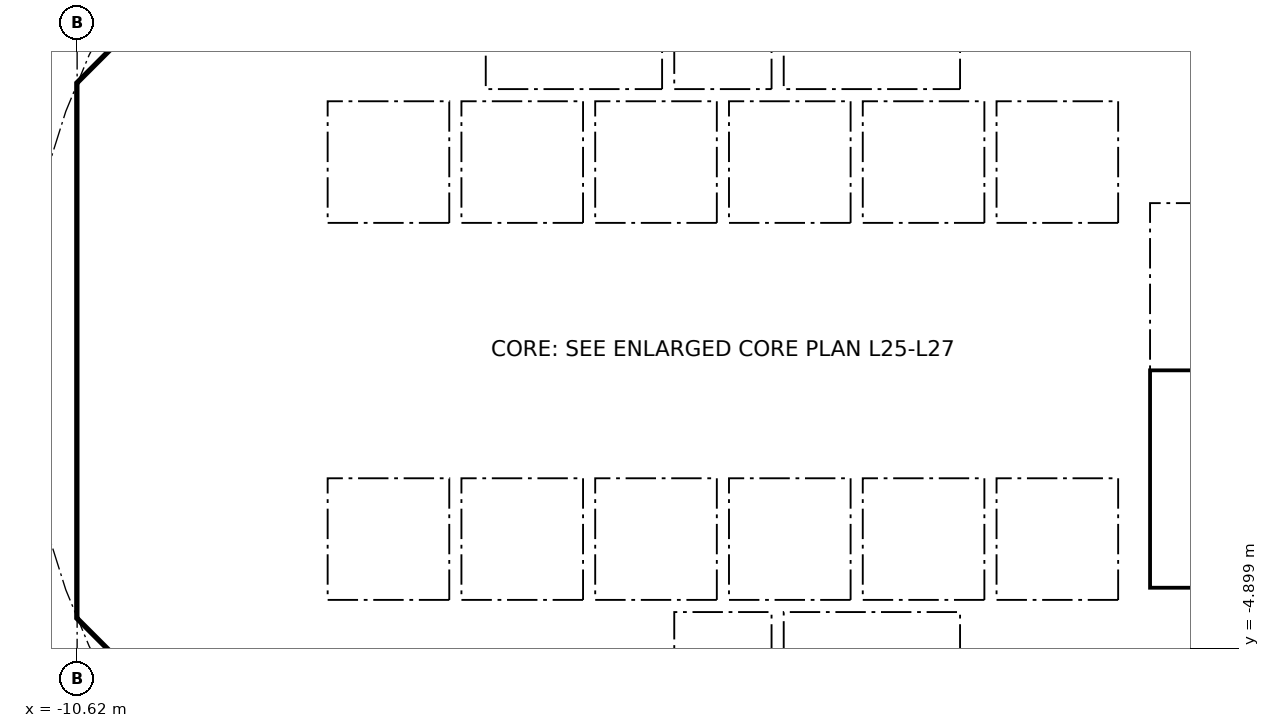
"""IFC4 building model, lengths in metres.
Left out: names, types, materials, properties, quantities, classifications, styles, units other than length and angle.
Written with IfcOpenShell. Run it as: python <this file> out.ifc"""

import sys

from ifc_helpers import new_model, si_unit, direction, frame, frame_2d, origin, place, context, subcontext, project, spatial, polyline, rectangle, outline, extrude, element, fill, save


model = new_model("IFC4")
c1 = context("Model", 3, precision=1e-05, world=origin(), true_north=direction((0.0, 1.0)))
c2 = subcontext(c1, "Body", "Model", "MODEL_VIEW")
j1 = project(units=[si_unit("LENGTHUNIT", "METRE"), si_unit("PLANEANGLEUNIT", "RADIAN")], contexts=[c1])
p1 = place(None, origin())
s1 = spatial("IfcSite", under=j1, at=p1, CompositionType="ELEMENT")
p2 = place(p1, origin())
s2 = spatial("IfcBuilding", under=s1, at=p2, CompositionType="ELEMENT")
p3 = place(p2, frame((0.0, 0.0, 102.9)))
s3 = spatial("IfcBuildingStorey", under=s2, at=p3, CompositionType="ELEMENT", Elevation=102.9)
p4 = place(p3, frame((9.988, 4.613, 0.0), z_axis=(0.0, 0.0, 1.0), x_axis=(-0.707106781187, 0.707106781187, 0.0)))
e1 = element("IfcWall", 1, at=p4, inside=s3, PredefinedType="SHEAR", context=c2, shape_type="SweptSolid", body=[
    extrude(rectangle(XDim=7.602, YDim=0.6, at=frame_2d((3.801, 0.0))), origin(), (0.0, 0.0, 1.0), 3.44),
])
p5 = place(p4, frame((3.201, 0.0, 0.0)))
e2 = element("IfcOpeningElement", 2, at=p5, cuts=e1, PredefinedType="OPENING", context=c2, shape_type="SweptSolid", body=[
    extrude(rectangle(XDim=1.2, YDim=2.1, at=frame_2d((0.6, 1.05))), frame((0.0, 0.31, 0.0), z_axis=(0.0, -1.0, 0.0), x_axis=(1.0, 0.0, 0.0)), (0.0, 0.0, 1.0), 0.62),
])
p6 = place(p3, frame((-4.613, 9.988, 0.0), z_axis=(0.0, 0.0, 1.0), x_axis=(-0.707106781187, -0.707106781187, 0.0)))
e3 = element("IfcWall", 3, at=p6, inside=s3, PredefinedType="SHEAR", context=c2, shape_type="SweptSolid", body=[
    extrude(rectangle(XDim=7.602, YDim=0.6, at=frame_2d((3.801, 0.0))), origin(), (0.0, 0.0, 1.0), 3.44),
])
p7 = place(p6, frame((0.351, 0.0, 0.0)))
e4 = element("IfcOpeningElement", 4, at=p7, cuts=e3, PredefinedType="OPENING", context=c2, shape_type="SweptSolid", body=[
    extrude(rectangle(XDim=1.1, YDim=2.1, at=frame_2d((0.55, 1.05))), frame((0.0, 0.31, 0.0), z_axis=(0.0, -1.0, 0.0), x_axis=(1.0, 0.0, 0.0)), (0.0, 0.0, 1.0), 0.62),
])
p8 = place(p3, frame((-10.325, 3.801, 0.0), z_axis=(0.0, 0.0, 1.0), x_axis=(0.0, -1.0, 0.0)))
e5 = element("IfcWall", 5, at=p8, inside=s3, PredefinedType="SHEAR", context=c2, shape_type="SweptSolid", body=[
    extrude(rectangle(XDim=7.602, YDim=0.6, at=frame_2d((3.801, 0.0))), origin(), (0.0, 0.0, 1.0), 3.44),
])
p9 = place(p8, frame((0.651, 0.0, 0.0)))
e6 = element("IfcOpeningElement", 6, at=p9, cuts=e5, PredefinedType="OPENING", context=c2, shape_type="SweptSolid", body=[
    extrude(rectangle(XDim=1.5, YDim=2.1, at=frame_2d((0.75, 1.05))), frame((0.0, 0.31, 0.0), z_axis=(0.0, -1.0, 0.0), x_axis=(1.0, 0.0, 0.0)), (0.0, 0.0, 1.0), 0.62),
])
p10 = place(p8, frame((5.451, 0.0, 0.0)))
e7 = element("IfcOpeningElement", 7, at=p10, cuts=e5, PredefinedType="OPENING", context=c2, shape_type="SweptSolid", body=[
    extrude(rectangle(XDim=1.5, YDim=2.1, at=frame_2d((0.75, 1.05))), frame((0.0, 0.31, 0.0), z_axis=(0.0, -1.0, 0.0), x_axis=(1.0, 0.0, 0.0)), (0.0, 0.0, 1.0), 0.62),
])
p11 = place(p3, frame((-9.988, -4.613, 0.0), z_axis=(0.0, 0.0, 1.0), x_axis=(0.707106781187, -0.707106781187, 0.0)))
e8 = element("IfcWall", 8, at=p11, inside=s3, PredefinedType="SHEAR", context=c2, shape_type="SweptSolid", body=[
    extrude(rectangle(XDim=7.602, YDim=0.6, at=frame_2d((3.801, 0.0))), origin(), (0.0, 0.0, 1.0), 3.44),
])
p12 = place(p11, frame((6.151, 0.0, 0.0)))
e9 = element("IfcOpeningElement", 9, at=p12, cuts=e8, PredefinedType="OPENING", context=c2, shape_type="SweptSolid", body=[
    extrude(rectangle(XDim=1.1, YDim=2.1, at=frame_2d((0.55, 1.05))), frame((0.0, 0.31, 0.0), z_axis=(0.0, -1.0, 0.0), x_axis=(1.0, 0.0, 0.0)), (0.0, 0.0, 1.0), 0.62),
])
p13 = place(p3, frame((4.613, -9.988, 0.0), z_axis=(0.0, 0.0, 1.0), x_axis=(0.707106781187, 0.707106781187, 0.0)))
e10 = element("IfcWall", 10, at=p13, inside=s3, PredefinedType="SHEAR", context=c2, shape_type="SweptSolid", body=[
    extrude(rectangle(XDim=7.602, YDim=0.6, at=frame_2d((3.801, 0.0))), origin(), (0.0, 0.0, 1.0), 3.44),
])
p14 = place(p13, frame((3.201, 0.0, 0.0)))
e11 = element("IfcOpeningElement", 11, at=p14, cuts=e10, PredefinedType="OPENING", context=c2, shape_type="SweptSolid", body=[
    extrude(rectangle(XDim=1.2, YDim=2.1, at=frame_2d((0.6, 1.05))), frame((0.0, 0.31, 0.0), z_axis=(0.0, -1.0, 0.0), x_axis=(1.0, 0.0, 0.0)), (0.0, 0.0, 1.0), 0.62),
])
p15 = place(p3, frame((-5.8, 4.3, 0.0), z_axis=(0.0, 0.0, 1.0), x_axis=(0.0, 1.0, 0.0)))
e12 = element("IfcWall", 12, at=p15, inside=s3, PredefinedType="PARTITIONING", context=c2, shape_type="SweptSolid", body=[
    extrude(rectangle(XDim=3.927, YDim=0.15, at=frame_2d((1.963, 0.0))), origin(), (0.0, 0.0, 1.0), 3.44),
])
p16 = place(p15, frame((0.413, 0.0, 0.0)))
e13 = element("IfcOpeningElement", 13, at=p16, cuts=e12, PredefinedType="OPENING", context=c2, shape_type="SweptSolid", body=[
    extrude(rectangle(XDim=0.9, YDim=2.1, at=frame_2d((0.45, 1.05))), frame((0.0, 0.085, 0.0), z_axis=(0.0, -1.0, 0.0), x_axis=(1.0, 0.0, 0.0)), (0.0, 0.0, 1.0), 0.17),
])
p17 = place(p15, frame((2.489, 0.0, 0.0)))
e14 = element("IfcOpeningElement", 14, at=p17, cuts=e12, PredefinedType="OPENING", context=c2, shape_type="SweptSolid", body=[
    extrude(rectangle(XDim=0.9, YDim=2.1, at=frame_2d((0.45, 1.05))), frame((0.0, 0.085, 0.0), z_axis=(0.0, -1.0, 0.0), x_axis=(1.0, 0.0, 0.0)), (0.0, 0.0, 1.0), 0.17),
])
p18 = place(p3, frame((4.0, 4.3, 0.0), z_axis=(0.0, 0.0, 1.0), x_axis=(0.0, 1.0, 0.0)))
e15 = element("IfcWall", 15, at=p18, inside=s3, PredefinedType="SOLIDWALL", context=c2, shape_type="SweptSolid", body=[
    extrude(rectangle(XDim=2.2, YDim=0.2, at=frame_2d((1.1, 0.0))), origin(), (0.0, 0.0, 1.0), 3.44),
])
p19 = place(p18, frame((0.55, 0.0, 0.0)))
e16 = element("IfcOpeningElement", 16, at=p19, cuts=e15, PredefinedType="OPENING", context=c2, shape_type="SweptSolid", body=[
    extrude(rectangle(XDim=1.1, YDim=2.1, at=frame_2d((0.55, 1.05))), frame((0.0, 0.11, 0.0), z_axis=(0.0, -1.0, 0.0), x_axis=(1.0, 0.0, 0.0)), (0.0, 0.0, 1.0), 0.22),
])
p20 = place(p3, frame((-4.0, 4.3, 0.0), z_axis=(0.0, 0.0, 1.0), x_axis=(0.0, 1.0, 0.0)))
e17 = element("IfcWall", 17, at=p20, inside=s3, PredefinedType="SOLIDWALL", context=c2, shape_type="SweptSolid", body=[
    extrude(rectangle(XDim=2.2, YDim=0.2, at=frame_2d((1.1, 0.0))), origin(), (0.0, 0.0, 1.0), 3.44),
])
p21 = place(p20, frame((0.55, 0.0, 0.0)))
e18 = element("IfcOpeningElement", 18, at=p21, cuts=e17, PredefinedType="OPENING", context=c2, shape_type="SweptSolid", body=[
    extrude(rectangle(XDim=1.1, YDim=2.1, at=frame_2d((0.55, 1.05))), frame((0.0, 0.11, 0.0), z_axis=(0.0, -1.0, 0.0), x_axis=(1.0, 0.0, 0.0)), (0.0, 0.0, 1.0), 0.22),
])
p22 = place(p3, frame((-6.7, 2.0, 0.0), z_axis=(0.0, 0.0, 1.0), x_axis=(1.0, 0.0, 0.0)))
e19 = element("IfcWall", 19, at=p22, inside=s3, PredefinedType="SOLIDWALL", context=c2, shape_type="SweptSolid", body=[
    extrude(rectangle(XDim=13.4, YDim=0.2, at=frame_2d((6.7, 0.0))), origin(), (0.0, 0.0, 1.0), 3.44),
])
p23 = place(p22, frame((0.65, 0.0, 0.0)))
e20 = element("IfcOpeningElement", 20, at=p23, cuts=e19, PredefinedType="OPENING", context=c2, shape_type="SweptSolid", body=[
    extrude(rectangle(XDim=1.1, YDim=2.1, at=frame_2d((0.55, 1.05))), frame((0.0, 0.11, 0.0), z_axis=(0.0, -1.0, 0.0), x_axis=(1.0, 0.0, 0.0)), (0.0, 0.0, 1.0), 0.22),
])
p24 = place(p22, frame((2.85, 0.0, 0.0)))
e21 = element("IfcOpeningElement", 21, at=p24, cuts=e19, PredefinedType="OPENING", context=c2, shape_type="SweptSolid", body=[
    extrude(rectangle(XDim=1.1, YDim=2.1, at=frame_2d((0.55, 1.05))), frame((0.0, 0.11, 0.0), z_axis=(0.0, -1.0, 0.0), x_axis=(1.0, 0.0, 0.0)), (0.0, 0.0, 1.0), 0.22),
])
p25 = place(p22, frame((5.05, 0.0, 0.0)))
e22 = element("IfcOpeningElement", 22, at=p25, cuts=e19, PredefinedType="OPENING", context=c2, shape_type="SweptSolid", body=[
    extrude(rectangle(XDim=1.1, YDim=2.1, at=frame_2d((0.55, 1.05))), frame((0.0, 0.11, 0.0), z_axis=(0.0, -1.0, 0.0), x_axis=(1.0, 0.0, 0.0)), (0.0, 0.0, 1.0), 0.22),
])
p26 = place(p3, frame((6.7, 4.0, 0.0), z_axis=(0.0, 0.0, 1.0), x_axis=(1.0, 0.0, 0.0)))
e23 = element("IfcWall", 23, at=p26, inside=s3, PredefinedType="SOLIDWALL", context=c2, shape_type="SweptSolid", body=[
    extrude(rectangle(XDim=3.325, YDim=0.2, at=frame_2d((1.662, 0.0))), origin(), (0.0, 0.0, 1.0), 3.44),
])
p27 = place(p26, frame((1.25, 0.0, 0.0)))
e24 = element("IfcOpeningElement", 24, at=p27, cuts=e23, PredefinedType="OPENING", context=c2, shape_type="SweptSolid", body=[
    extrude(rectangle(XDim=1.1, YDim=2.1, at=frame_2d((0.55, 1.05))), frame((0.0, 0.11, 0.0), z_axis=(0.0, -1.0, 0.0), x_axis=(1.0, 0.0, 0.0)), (0.0, 0.0, 1.0), 0.22),
])
p28 = place(p3, frame((-5.8, -8.227, 0.0), z_axis=(0.0, 0.0, 1.0), x_axis=(0.0, 1.0, 0.0)))
e25 = element("IfcWall", 25, at=p28, inside=s3, PredefinedType="PARTITIONING", context=c2, shape_type="SweptSolid", body=[
    extrude(rectangle(XDim=3.927, YDim=0.15, at=frame_2d((1.963, 0.0))), origin(), (0.0, 0.0, 1.0), 3.44),
])
p29 = place(p28, frame((2.615, 0.0, 0.0)))
e26 = element("IfcOpeningElement", 26, at=p29, cuts=e25, PredefinedType="OPENING", context=c2, shape_type="SweptSolid", body=[
    extrude(rectangle(XDim=0.9, YDim=2.1, at=frame_2d((0.45, 1.05))), frame((0.0, 0.085, 0.0), z_axis=(0.0, -1.0, 0.0), x_axis=(1.0, 0.0, 0.0)), (0.0, 0.0, 1.0), 0.17),
])
p30 = place(p28, frame((0.539, 0.0, 0.0)))
e27 = element("IfcOpeningElement", 27, at=p30, cuts=e25, PredefinedType="OPENING", context=c2, shape_type="SweptSolid", body=[
    extrude(rectangle(XDim=0.9, YDim=2.1, at=frame_2d((0.45, 1.05))), frame((0.0, 0.085, 0.0), z_axis=(0.0, -1.0, 0.0), x_axis=(1.0, 0.0, 0.0)), (0.0, 0.0, 1.0), 0.17),
])
p31 = place(p3, frame((4.0, -6.5, 0.0), z_axis=(0.0, 0.0, 1.0), x_axis=(0.0, 1.0, 0.0)))
e28 = element("IfcWall", 28, at=p31, inside=s3, PredefinedType="SOLIDWALL", context=c2, shape_type="SweptSolid", body=[
    extrude(rectangle(XDim=2.2, YDim=0.2, at=frame_2d((1.1, 0.0))), origin(), (0.0, 0.0, 1.0), 3.44),
])
p32 = place(p31, frame((0.55, 0.0, 0.0)))
e29 = element("IfcOpeningElement", 29, at=p32, cuts=e28, PredefinedType="OPENING", context=c2, shape_type="SweptSolid", body=[
    extrude(rectangle(XDim=1.1, YDim=2.1, at=frame_2d((0.55, 1.05))), frame((0.0, 0.11, 0.0), z_axis=(0.0, -1.0, 0.0), x_axis=(1.0, 0.0, 0.0)), (0.0, 0.0, 1.0), 0.22),
])
p33 = place(p3, frame((-4.0, -6.5, 0.0), z_axis=(0.0, 0.0, 1.0), x_axis=(0.0, 1.0, 0.0)))
e30 = element("IfcWall", 30, at=p33, inside=s3, PredefinedType="SOLIDWALL", context=c2, shape_type="SweptSolid", body=[
    extrude(rectangle(XDim=2.2, YDim=0.2, at=frame_2d((1.1, 0.0))), origin(), (0.0, 0.0, 1.0), 3.44),
])
p34 = place(p33, frame((0.65, 0.0, 0.0)))
e31 = element("IfcOpeningElement", 31, at=p34, cuts=e30, PredefinedType="OPENING", context=c2, shape_type="SweptSolid", body=[
    extrude(rectangle(XDim=0.9, YDim=2.1, at=frame_2d((0.45, 1.05))), frame((0.0, 0.11, 0.0), z_axis=(0.0, -1.0, 0.0), x_axis=(1.0, 0.0, 0.0)), (0.0, 0.0, 1.0), 0.22),
])
p35 = place(p3, frame((-6.7, -2.0, 0.0), z_axis=(0.0, 0.0, 1.0), x_axis=(1.0, 0.0, 0.0)))
e32 = element("IfcWall", 32, at=p35, inside=s3, PredefinedType="SOLIDWALL", context=c2, shape_type="SweptSolid", body=[
    extrude(rectangle(XDim=13.4, YDim=0.2, at=frame_2d((6.7, 0.0))), origin(), (0.0, 0.0, 1.0), 3.44),
])
p36 = place(p35, frame((0.65, 0.0, 0.0)))
e33 = element("IfcOpeningElement", 33, at=p36, cuts=e32, PredefinedType="OPENING", context=c2, shape_type="SweptSolid", body=[
    extrude(rectangle(XDim=1.1, YDim=2.1, at=frame_2d((0.55, 1.05))), frame((0.0, 0.11, 0.0), z_axis=(0.0, -1.0, 0.0), x_axis=(1.0, 0.0, 0.0)), (0.0, 0.0, 1.0), 0.22),
])
p37 = place(p35, frame((2.85, 0.0, 0.0)))
e34 = element("IfcOpeningElement", 34, at=p37, cuts=e32, PredefinedType="OPENING", context=c2, shape_type="SweptSolid", body=[
    extrude(rectangle(XDim=1.1, YDim=2.1, at=frame_2d((0.55, 1.05))), frame((0.0, 0.11, 0.0), z_axis=(0.0, -1.0, 0.0), x_axis=(1.0, 0.0, 0.0)), (0.0, 0.0, 1.0), 0.22),
])
p38 = place(p3, origin())
e35 = element("IfcWall", 35, at=p38, inside=s3, PredefinedType="SHEAR", context=c2, shape_type="SweptSolid", body=[
    extrude(outline(polyline([(-10.625, -3.801), (-10.025, -3.801), (-10.025, -4.152), (-9.776, -4.401), (-10.2, -4.825), (-10.625, -4.401), (-10.625, -3.801)])), origin(), (0.0, 0.0, 1.0), 3.44),
])
p39 = place(p3, origin())
e36 = element("IfcWall", 36, at=p39, inside=s3, PredefinedType="SHEAR", context=c2, shape_type="SweptSolid", body=[
    extrude(outline(polyline([(-10.2, 4.825), (-9.776, 4.401), (-10.025, 4.152), (-10.025, 3.801), (-10.625, 3.801), (-10.625, 4.401), (-10.2, 4.825)])), origin(), (0.0, 0.0, 1.0), 3.44),
])
for number, where, z_axis, x_axis in (
    (37, (-10.025, -4.0, 0.0), (0.0, 0.0, 1.0), (1.0, 0.0, 0.0)),
    (38, (-10.025, 4.0, 0.0), (0.0, 0.0, 1.0), (1.0, 0.0, 0.0)),
):
    element("IfcWall", number, at=place(p3, frame(where, z_axis=z_axis, x_axis=x_axis)), inside=s3, PredefinedType="PARTITIONING", context=c2, shape_type="SweptSolid", body=[
        extrude(rectangle(XDim=3.325, YDim=0.2, at=frame_2d((1.662, 0.0))), origin(), (0.0, 0.0, 1.0), 3.44),
    ])
for number, where, z_axis, x_axis in (
    (39, (-0.9, -6.5, 0.0), (0.0, 0.0, 1.0), (0.0, 1.0, 0.0)),
    (40, (0.9, -6.5, 0.0), (0.0, 0.0, 1.0), (0.0, 1.0, 0.0)),
):
    element("IfcWall", number, at=place(p3, frame(where, z_axis=z_axis, x_axis=x_axis)), inside=s3, PredefinedType="SOLIDWALL", context=c2, shape_type="SweptSolid", body=[
        extrude(rectangle(XDim=2.2, YDim=0.2, at=frame_2d((1.1, 0.0))), origin(), (0.0, 0.0, 1.0), 3.44),
    ])
p40 = place(p3, origin())
e41 = element("IfcWall", 41, at=p40, inside=s3, PredefinedType="SOLIDWALL", context=c2, shape_type="SweptSolid", body=[
    extrude(outline(polyline([(-6.7, -2.1), (-6.5, -2.1), (-6.5, -4.1), (-4.5, -4.1), (-4.5, -2.1), (-4.3, -2.1), (-4.3, -4.1), (-2.3, -4.1), (-2.3, -2.1), (-2.1, -2.1), (-2.1, -4.1), (-0.1, -4.1), (-0.1, -2.1), (0.1, -2.1), (0.1, -4.1), (2.1, -4.1), (2.1, -2.1), (2.3, -2.1), (2.3, -4.1), (4.3, -4.1), (4.3, -2.1), (4.5, -2.1), (4.5, -4.1), (6.5, -4.1), (6.5, -2.1), (6.7, -2.1), (6.7, -4.3), (-6.7, -4.3), (-6.7, -2.1)])), origin(), (0.0, 0.0, 1.0), 3.44),
])
for number, where, z_axis, x_axis in (
    (42, (-0.9, 4.3, 0.0), (0.0, 0.0, 1.0), (0.0, 1.0, 0.0)),
    (43, (0.9, 4.3, 0.0), (0.0, 0.0, 1.0), (0.0, 1.0, 0.0)),
):
    element("IfcWall", number, at=place(p3, frame(where, z_axis=z_axis, x_axis=x_axis)), inside=s3, PredefinedType="SOLIDWALL", context=c2, shape_type="SweptSolid", body=[
        extrude(rectangle(XDim=2.2, YDim=0.2, at=frame_2d((1.1, 0.0))), origin(), (0.0, 0.0, 1.0), 3.44),
    ])
p41 = place(p3, origin())
e44 = element("IfcWall", 44, at=p41, inside=s3, PredefinedType="SOLIDWALL", context=c2, shape_type="SweptSolid", body=[
    extrude(outline(polyline([(-6.5, 2.1), (-6.7, 2.1), (-6.7, 4.3), (6.7, 4.3), (6.7, 2.1), (6.5, 2.1), (6.5, 4.1), (4.5, 4.1), (4.5, 2.1), (4.3, 2.1), (4.3, 4.1), (2.3, 4.1), (2.3, 2.1), (2.1, 2.1), (2.1, 4.1), (0.1, 4.1), (0.1, 2.1), (-0.1, 2.1), (-0.1, 4.1), (-2.1, 4.1), (-2.1, 2.1), (-2.3, 2.1), (-2.3, 4.1), (-4.3, 4.1), (-4.3, 2.1), (-4.5, 2.1), (-4.5, 4.1), (-6.5, 4.1), (-6.5, 2.1)])), origin(), (0.0, 0.0, 1.0), 3.44),
])
p42 = place(p3, origin())
e45 = element("IfcWall", 45, at=p42, inside=s3, PredefinedType="SOLIDWALL", context=c2, shape_type="SweptSolid", body=[
    extrude(outline(polyline([(7.025, -3.9), (6.7, -3.9), (6.7, 3.9), (7.025, 3.9), (7.025, -3.9)])), origin(), (0.0, 0.0, 1.0), 3.44),
])
p43 = place(p3, origin())
e46 = element("IfcWall", 46, at=p43, inside=s3, PredefinedType="SOLIDWALL", context=c2, shape_type="SweptSolid", body=[
    extrude(outline(polyline([(10.025, -4.1), (6.7, -4.1), (6.7, -3.9), (10.025, -3.9), (10.025, -4.1)])), origin(), (0.0, 0.0, 1.0), 3.44),
])
p44 = place(p23, origin())
e47 = element("IfcDoor", 47, at=p44, inside=s3, OperationType="DOUBLE_DOOR_SLIDING", PredefinedType="DOOR", context=c2, shape_type="SweptSolid", body=[
    extrude(rectangle(XDim=1.1, YDim=2.1, at=frame_2d((0.55, 1.05))), frame((0.0, 0.025, 0.0), z_axis=(0.0, -1.0, 0.0), x_axis=(1.0, 0.0, 0.0)), (0.0, 0.0, 1.0), 0.05),
])
fill(e20, e47)
p45 = place(p24, origin())
e48 = element("IfcDoor", 48, at=p45, inside=s3, OperationType="DOUBLE_DOOR_SLIDING", PredefinedType="DOOR", context=c2, shape_type="SweptSolid", body=[
    extrude(rectangle(XDim=1.1, YDim=2.1, at=frame_2d((0.55, 1.05))), frame((0.0, 0.025, 0.0), z_axis=(0.0, -1.0, 0.0), x_axis=(1.0, 0.0, 0.0)), (0.0, 0.0, 1.0), 0.05),
])
fill(e21, e48)
p46 = place(p25, origin())
e49 = element("IfcDoor", 49, at=p46, inside=s3, OperationType="DOUBLE_DOOR_SLIDING", PredefinedType="DOOR", context=c2, shape_type="SweptSolid", body=[
    extrude(rectangle(XDim=1.1, YDim=2.1, at=frame_2d((0.55, 1.05))), frame((0.0, 0.025, 0.0), z_axis=(0.0, -1.0, 0.0), x_axis=(1.0, 0.0, 0.0)), (0.0, 0.0, 1.0), 0.05),
])
fill(e22, e49)
p47 = place(p36, origin())
e50 = element("IfcDoor", 50, at=p47, inside=s3, OperationType="DOUBLE_DOOR_SLIDING", PredefinedType="DOOR", context=c2, shape_type="SweptSolid", body=[
    extrude(rectangle(XDim=1.1, YDim=2.1, at=frame_2d((0.55, 1.05))), frame((0.0, 0.025, 0.0), z_axis=(0.0, -1.0, 0.0), x_axis=(1.0, 0.0, 0.0)), (0.0, 0.0, 1.0), 0.05),
])
fill(e33, e50)
p48 = place(p37, origin())
e51 = element("IfcDoor", 51, at=p48, inside=s3, OperationType="DOUBLE_DOOR_SLIDING", PredefinedType="DOOR", context=c2, shape_type="SweptSolid", body=[
    extrude(rectangle(XDim=1.1, YDim=2.1, at=frame_2d((0.55, 1.05))), frame((0.0, 0.025, 0.0), z_axis=(0.0, -1.0, 0.0), x_axis=(1.0, 0.0, 0.0)), (0.0, 0.0, 1.0), 0.05),
])
fill(e34, e51)
p49 = place(p19, origin())
e52 = element("IfcDoor", 52, at=p49, inside=s3, OperationType="DOUBLE_DOOR_SLIDING", PredefinedType="DOOR", context=c2, shape_type="SweptSolid", body=[
    extrude(rectangle(XDim=1.1, YDim=2.1, at=frame_2d((0.55, 1.05))), frame((0.0, 0.025, 0.0), z_axis=(0.0, -1.0, 0.0), x_axis=(1.0, 0.0, 0.0)), (0.0, 0.0, 1.0), 0.05),
])
fill(e16, e52)
p50 = place(p32, origin())
e53 = element("IfcDoor", 53, at=p50, inside=s3, OperationType="DOUBLE_DOOR_SLIDING", PredefinedType="DOOR", context=c2, shape_type="SweptSolid", body=[
    extrude(rectangle(XDim=1.1, YDim=2.1, at=frame_2d((0.55, 1.05))), frame((0.0, 0.025, 0.0), z_axis=(0.0, -1.0, 0.0), x_axis=(1.0, 0.0, 0.0)), (0.0, 0.0, 1.0), 0.05),
])
fill(e29, e53)
p51 = place(p21, origin())
e54 = element("IfcDoor", 54, at=p51, inside=s3, OperationType="DOUBLE_DOOR_SLIDING", PredefinedType="DOOR", context=c2, shape_type="SweptSolid", body=[
    extrude(rectangle(XDim=1.1, YDim=2.1, at=frame_2d((0.55, 1.05))), frame((0.0, 0.025, 0.0), z_axis=(0.0, -1.0, 0.0), x_axis=(1.0, 0.0, 0.0)), (0.0, 0.0, 1.0), 0.05),
])
fill(e18, e54)
p52 = place(p16, origin())
e55 = element("IfcDoor", 55, at=p52, inside=s3, OperationType="SINGLE_SWING_RIGHT", PredefinedType="DOOR", context=c2, shape_type="SweptSolid", body=[
    extrude(rectangle(XDim=0.9, YDim=2.1, at=frame_2d((0.45, 1.05))), frame((0.0, 0.025, 0.0), z_axis=(0.0, -1.0, 0.0), x_axis=(1.0, 0.0, 0.0)), (0.0, 0.0, 1.0), 0.05),
])
fill(e13, e55)
p53 = place(p29, origin())
e56 = element("IfcDoor", 56, at=p53, inside=s3, OperationType="SINGLE_SWING_RIGHT", PredefinedType="DOOR", context=c2, shape_type="SweptSolid", body=[
    extrude(rectangle(XDim=0.9, YDim=2.1, at=frame_2d((0.45, 1.05))), frame((0.0, 0.025, 0.0), z_axis=(0.0, -1.0, 0.0), x_axis=(1.0, 0.0, 0.0)), (0.0, 0.0, 1.0), 0.05),
])
fill(e26, e56)
p54 = place(p9, origin())
e57 = element("IfcDoor", 57, at=p54, inside=s3, OperationType="DOUBLE_DOOR_SINGLE_SWING", PredefinedType="DOOR", context=c2, shape_type="SweptSolid", body=[
    extrude(rectangle(XDim=1.5, YDim=2.1, at=frame_2d((0.75, 1.05))), frame((0.0, 0.025, 0.0), z_axis=(0.0, -1.0, 0.0), x_axis=(1.0, 0.0, 0.0)), (0.0, 0.0, 1.0), 0.05),
])
fill(e6, e57)
p55 = place(p10, origin())
e58 = element("IfcDoor", 58, at=p55, inside=s3, OperationType="DOUBLE_DOOR_SINGLE_SWING", PredefinedType="DOOR", context=c2, shape_type="SweptSolid", body=[
    extrude(rectangle(XDim=1.5, YDim=2.1, at=frame_2d((0.75, 1.05))), frame((0.0, 0.025, 0.0), z_axis=(0.0, -1.0, 0.0), x_axis=(1.0, 0.0, 0.0)), (0.0, 0.0, 1.0), 0.05),
])
fill(e7, e58)
save(model, sys.argv[1])
